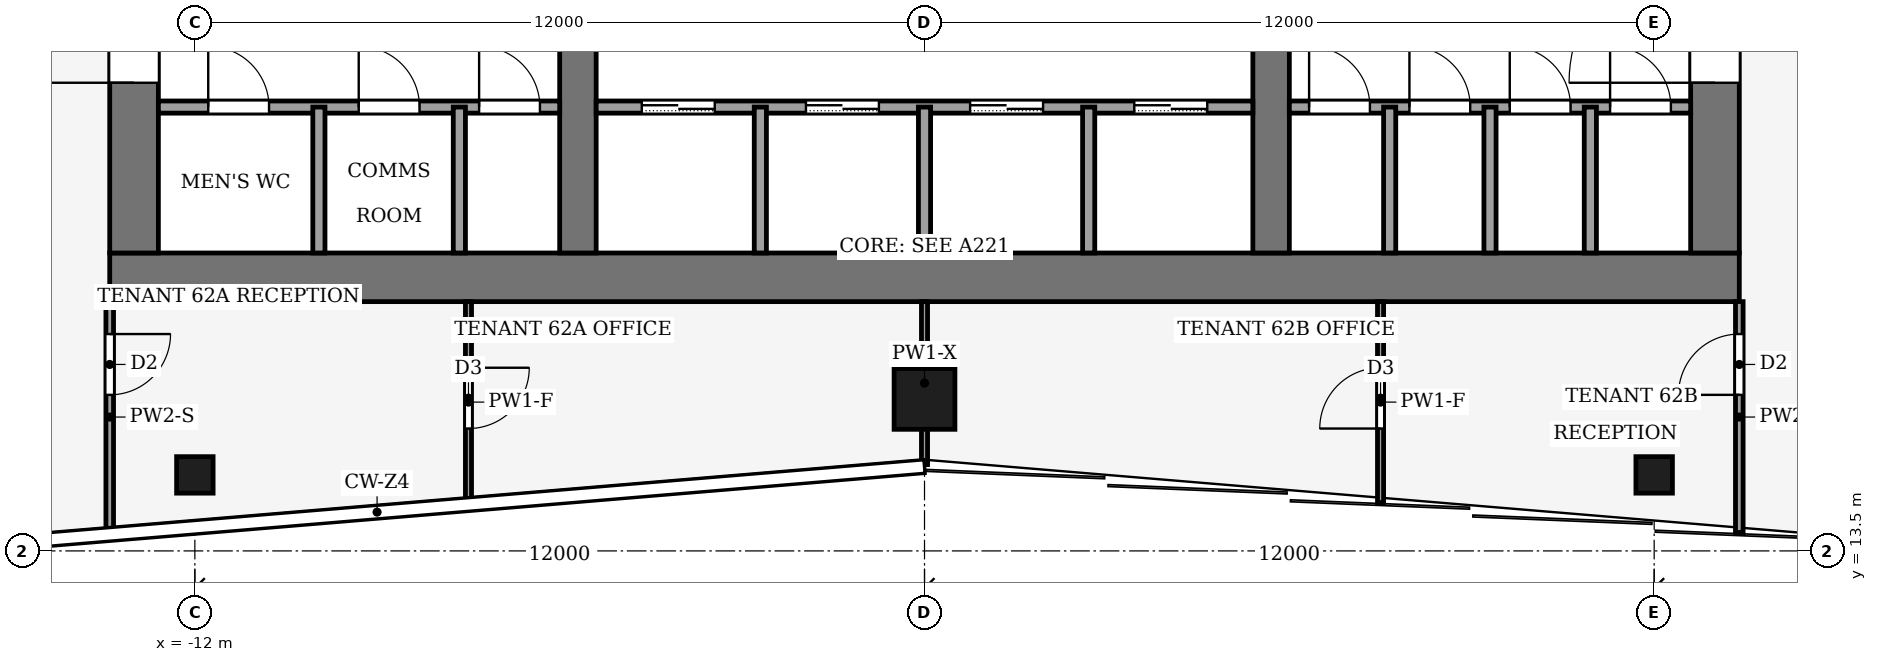
"""IFC4 building model, lengths in metres.
Left out: names, types, materials, properties, quantities, classifications, styles, units other than length and angle.
Written with IfcOpenShell. Run it as: python <this file> out.ifc"""

import sys

from ifc_helpers import new_model, si_unit, direction, frame, frame_2d, origin, origin_2d, place, context, subcontext, project, spatial, rectangle, hollow_rectangle, extrude, element, fill, save


model = new_model("IFC4")
c1 = context("Model", 3, precision=1e-05, world=origin(), true_north=direction((0.0, 1.0)))
c2 = subcontext(c1, "Body", "Model", "MODEL_VIEW")
j1 = project(units=[si_unit("LENGTHUNIT", "METRE"), si_unit("PLANEANGLEUNIT", "RADIAN")], contexts=[c1])
p1 = place(None, origin())
s1 = spatial("IfcSite", under=j1, at=p1, CompositionType="ELEMENT")
p2 = place(p1, origin())
s2 = spatial("IfcBuilding", under=s1, at=p2, CompositionType="ELEMENT")
p3 = place(p2, frame((0.0, 0.0, 270.0)))
s3 = spatial("IfcBuildingStorey", under=s2, at=p3, CompositionType="ELEMENT", Elevation=270.0)
p4 = place(p3, frame((-13.4, 18.0, -0.13), z_axis=(0.0, 0.0, 1.0), x_axis=(1.0, 0.0, 0.0)))
e1 = element("IfcWall", 1, at=p4, inside=s3, PredefinedType="SHEAR", context=c2, shape_type="SweptSolid", body=[
    extrude(rectangle(XDim=26.8, YDim=0.8, at=frame_2d((13.4, 0.0))), origin(), (0.0, 0.0, 1.0), 4.0),
])
p5 = place(p3, frame((-13.0, 18.4, -0.13), z_axis=(0.0, 0.0, 1.0), x_axis=(0.0, 1.0, 0.0)))
e2 = element("IfcWall", 2, at=p5, inside=s3, PredefinedType="SHEAR", context=c2, shape_type="SweptSolid", body=[
    extrude(rectangle(XDim=19.2, YDim=0.8, at=frame_2d((9.6, 0.0))), origin(), (0.0, 0.0, 1.0), 4.0),
])
p6 = place(p5, frame((2.8, 0.0, 0.13)))
e3 = element("IfcOpeningElement", 3, at=p6, cuts=e2, PredefinedType="OPENING", context=c2, shape_type="SweptSolid", body=[
    extrude(rectangle(XDim=2.4, YDim=2.4, at=frame_2d((1.2, 1.2))), frame((0.0, 0.41, 0.0), z_axis=(0.0, -1.0, 0.0), x_axis=(1.0, 0.0, 0.0)), (0.0, 0.0, 1.0), 0.82),
])
p7 = place(p5, frame((13.4, 0.0, 0.13)))
e4 = element("IfcOpeningElement", 4, at=p7, cuts=e2, PredefinedType="OPENING", context=c2, shape_type="SweptSolid", body=[
    extrude(rectangle(XDim=1.4, YDim=2.2, at=frame_2d((0.7, 1.1))), frame((0.0, 0.41, 0.0), z_axis=(0.0, -1.0, 0.0), x_axis=(1.0, 0.0, 0.0)), (0.0, 0.0, 1.0), 0.82),
])
p8 = place(p3, frame((13.0, 18.4, -0.13), z_axis=(0.0, 0.0, 1.0), x_axis=(0.0, 1.0, 0.0)))
e5 = element("IfcWall", 5, at=p8, inside=s3, PredefinedType="SHEAR", context=c2, shape_type="SweptSolid", body=[
    extrude(rectangle(XDim=19.2, YDim=0.8, at=frame_2d((9.6, 0.0))), origin(), (0.0, 0.0, 1.0), 4.0),
])
p9 = place(p8, frame((2.8, 0.0, 0.13)))
e6 = element("IfcOpeningElement", 6, at=p9, cuts=e5, PredefinedType="OPENING", context=c2, shape_type="SweptSolid", body=[
    extrude(rectangle(XDim=2.4, YDim=2.4, at=frame_2d((1.2, 1.2))), frame((0.0, 0.41, 0.0), z_axis=(0.0, -1.0, 0.0), x_axis=(1.0, 0.0, 0.0)), (0.0, 0.0, 1.0), 0.82),
])
p10 = place(p8, frame((13.3, 0.0, 0.13)))
e7 = element("IfcOpeningElement", 7, at=p10, cuts=e5, PredefinedType="OPENING", context=c2, shape_type="SweptSolid", body=[
    extrude(rectangle(XDim=2.4, YDim=2.4, at=frame_2d((1.2, 1.2))), frame((0.0, 0.41, 0.0), z_axis=(0.0, -1.0, 0.0), x_axis=(1.0, 0.0, 0.0)), (0.0, 0.0, 1.0), 0.82),
])
p11 = place(p3, frame((-5.7, 18.4, -0.13), z_axis=(0.0, 0.0, 1.0), x_axis=(0.0, 1.0, 0.0)))
e8 = element("IfcWall", 8, at=p11, inside=s3, PredefinedType="SHEAR", context=c2, shape_type="SweptSolid", body=[
    extrude(rectangle(XDim=19.2, YDim=0.6, at=frame_2d((9.6, 0.0))), origin(), (0.0, 0.0, 1.0), 4.0),
])
p12 = place(p11, frame((8.35, 0.0, 0.13)))
e9 = element("IfcOpeningElement", 9, at=p12, cuts=e8, PredefinedType="OPENING", context=c2, shape_type="SweptSolid", body=[
    extrude(rectangle(XDim=0.9, YDim=2.1, at=frame_2d((0.45, 1.05))), frame((0.0, 0.31, 0.0), z_axis=(0.0, -1.0, 0.0), x_axis=(1.0, 0.0, 0.0)), (0.0, 0.0, 1.0), 0.62),
])
p13 = place(p3, frame((5.7, 18.4, -0.13), z_axis=(0.0, 0.0, 1.0), x_axis=(0.0, 1.0, 0.0)))
e10 = element("IfcWall", 10, at=p13, inside=s3, PredefinedType="SHEAR", context=c2, shape_type="SweptSolid", body=[
    extrude(rectangle(XDim=19.2, YDim=0.6, at=frame_2d((9.6, 0.0))), origin(), (0.0, 0.0, 1.0), 4.0),
])
p14 = place(p13, frame((13.3, 0.0, 0.13)))
e11 = element("IfcOpeningElement", 11, at=p14, cuts=e10, PredefinedType="OPENING", context=c2, shape_type="SweptSolid", body=[
    extrude(rectangle(XDim=2.4, YDim=2.4, at=frame_2d((1.2, 1.2))), frame((0.0, 0.31, 0.0), z_axis=(0.0, -1.0, 0.0), x_axis=(1.0, 0.0, 0.0)), (0.0, 0.0, 1.0), 0.62),
])
p15 = place(p3, frame((0.0, 16.0, 0.0), z_axis=(0.0, 0.0, 1.0), x_axis=(1.0, 0.0, 0.0)))
e12 = element("IfcColumn", 12, at=p15, inside=s3, PredefinedType="COLUMN", context=c2, shape_type="SweptSolid", body=[
    extrude(hollow_rectangle(XDim=1.0, YDim=1.0, WallThickness=0.045, at=origin_2d()), origin(), (0.0, 0.0, 1.0), 4.0),
])
for number, where, z_axis, x_axis in (
    (13, (-12.0, 14.75, 0.0), (0.0, 0.0, 1.0), (1.0, 0.0, 0.0)),
    (14, (12.0, 14.75, 0.0), (0.0, 0.0, 1.0), (1.0, 0.0, 0.0)),
):
    element("IfcColumn", number, at=place(p3, frame(where, z_axis=z_axis, x_axis=x_axis)), inside=s3, PredefinedType="COLUMN", context=c2, shape_type="SweptSolid", body=[
        extrude(hollow_rectangle(XDim=0.6, YDim=0.6, WallThickness=0.025, at=origin_2d()), origin(), (0.0, 0.0, 1.0), 4.0),
    ])
p16 = place(p3, frame((-12.6, 20.8, 0.0), z_axis=(0.0, 0.0, 1.0), x_axis=(1.0, 0.0, 0.0)))
e15 = element("IfcWall", 15, at=p16, inside=s3, PredefinedType="PARTITIONING", context=c2, shape_type="SweptSolid", body=[
    extrude(rectangle(XDim=6.6, YDim=0.2, at=frame_2d((3.3, 0.0))), origin(), (0.0, 0.0, 1.0), 3.87),
])
p17 = place(p16, frame((0.82, 0.0, 0.0)))
e16 = element("IfcOpeningElement", 16, at=p17, cuts=e15, PredefinedType="OPENING", context=c2, shape_type="SweptSolid", body=[
    extrude(rectangle(XDim=1.0, YDim=2.1, at=frame_2d((0.5, 1.05))), frame((0.0, 0.11, 0.0), z_axis=(0.0, -1.0, 0.0), x_axis=(1.0, 0.0, 0.0)), (0.0, 0.0, 1.0), 0.22),
])
p18 = place(p16, frame((3.295, 0.0, 0.0)))
e17 = element("IfcOpeningElement", 17, at=p18, cuts=e15, PredefinedType="OPENING", context=c2, shape_type="SweptSolid", body=[
    extrude(rectangle(XDim=1.0, YDim=2.1, at=frame_2d((0.5, 1.05))), frame((0.0, 0.11, 0.0), z_axis=(0.0, -1.0, 0.0), x_axis=(1.0, 0.0, 0.0)), (0.0, 0.0, 1.0), 0.22),
])
p19 = place(p16, frame((5.275, 0.0, 0.0)))
e18 = element("IfcOpeningElement", 18, at=p19, cuts=e15, PredefinedType="OPENING", context=c2, shape_type="SweptSolid", body=[
    extrude(rectangle(XDim=1.0, YDim=2.1, at=frame_2d((0.5, 1.05))), frame((0.0, 0.11, 0.0), z_axis=(0.0, -1.0, 0.0), x_axis=(1.0, 0.0, 0.0)), (0.0, 0.0, 1.0), 0.22),
])
p20 = place(p3, frame((-5.4, 20.8, 0.0), z_axis=(0.0, 0.0, 1.0), x_axis=(1.0, 0.0, 0.0)))
e19 = element("IfcWall", 19, at=p20, inside=s3, PredefinedType="PARTITIONING", context=c2, shape_type="SweptSolid", body=[
    extrude(rectangle(XDim=10.8, YDim=0.2, at=frame_2d((5.4, 0.0))), origin(), (0.0, 0.0, 1.0), 3.87),
])
p21 = place(p20, frame((0.75, 0.0, 0.0)))
e20 = element("IfcOpeningElement", 20, at=p21, cuts=e19, PredefinedType="OPENING", context=c2, shape_type="SweptSolid", body=[
    extrude(rectangle(XDim=1.2, YDim=2.2, at=frame_2d((0.6, 1.1))), frame((0.0, 0.11, 0.0), z_axis=(0.0, -1.0, 0.0), x_axis=(1.0, 0.0, 0.0)), (0.0, 0.0, 1.0), 0.22),
])
p22 = place(p20, frame((3.45, 0.0, 0.0)))
e21 = element("IfcOpeningElement", 21, at=p22, cuts=e19, PredefinedType="OPENING", context=c2, shape_type="SweptSolid", body=[
    extrude(rectangle(XDim=1.2, YDim=2.2, at=frame_2d((0.6, 1.1))), frame((0.0, 0.11, 0.0), z_axis=(0.0, -1.0, 0.0), x_axis=(1.0, 0.0, 0.0)), (0.0, 0.0, 1.0), 0.22),
])
p23 = place(p20, frame((6.15, 0.0, 0.0)))
e22 = element("IfcOpeningElement", 22, at=p23, cuts=e19, PredefinedType="OPENING", context=c2, shape_type="SweptSolid", body=[
    extrude(rectangle(XDim=1.2, YDim=2.2, at=frame_2d((0.6, 1.1))), frame((0.0, 0.11, 0.0), z_axis=(0.0, -1.0, 0.0), x_axis=(1.0, 0.0, 0.0)), (0.0, 0.0, 1.0), 0.22),
])
p24 = place(p20, frame((8.85, 0.0, 0.0)))
e23 = element("IfcOpeningElement", 23, at=p24, cuts=e19, PredefinedType="OPENING", context=c2, shape_type="SweptSolid", body=[
    extrude(rectangle(XDim=1.2, YDim=2.2, at=frame_2d((0.6, 1.1))), frame((0.0, 0.11, 0.0), z_axis=(0.0, -1.0, 0.0), x_axis=(1.0, 0.0, 0.0)), (0.0, 0.0, 1.0), 0.22),
])
p25 = place(p3, frame((6.0, 20.8, 0.0), z_axis=(0.0, 0.0, 1.0), x_axis=(1.0, 0.0, 0.0)))
e24 = element("IfcWall", 24, at=p25, inside=s3, PredefinedType="PARTITIONING", context=c2, shape_type="SweptSolid", body=[
    extrude(rectangle(XDim=6.6, YDim=0.2, at=frame_2d((3.3, 0.0))), origin(), (0.0, 0.0, 1.0), 3.87),
])
p26 = place(p25, frame((0.325, 0.0, 0.0)))
e25 = element("IfcOpeningElement", 25, at=p26, cuts=e24, PredefinedType="OPENING", context=c2, shape_type="SweptSolid", body=[
    extrude(rectangle(XDim=1.0, YDim=2.1, at=frame_2d((0.5, 1.05))), frame((0.0, 0.11, 0.0), z_axis=(0.0, -1.0, 0.0), x_axis=(1.0, 0.0, 0.0)), (0.0, 0.0, 1.0), 0.22),
])
p27 = place(p25, frame((1.975, 0.0, 0.0)))
e26 = element("IfcOpeningElement", 26, at=p27, cuts=e24, PredefinedType="OPENING", context=c2, shape_type="SweptSolid", body=[
    extrude(rectangle(XDim=1.0, YDim=2.1, at=frame_2d((0.5, 1.05))), frame((0.0, 0.11, 0.0), z_axis=(0.0, -1.0, 0.0), x_axis=(1.0, 0.0, 0.0)), (0.0, 0.0, 1.0), 0.22),
])
p28 = place(p25, frame((3.625, 0.0, 0.0)))
e27 = element("IfcOpeningElement", 27, at=p28, cuts=e24, PredefinedType="OPENING", context=c2, shape_type="SweptSolid", body=[
    extrude(rectangle(XDim=1.0, YDim=2.1, at=frame_2d((0.5, 1.05))), frame((0.0, 0.11, 0.0), z_axis=(0.0, -1.0, 0.0), x_axis=(1.0, 0.0, 0.0)), (0.0, 0.0, 1.0), 0.22),
])
p29 = place(p25, frame((5.275, 0.0, 0.0)))
e28 = element("IfcOpeningElement", 28, at=p29, cuts=e24, PredefinedType="OPENING", context=c2, shape_type="SweptSolid", body=[
    extrude(rectangle(XDim=1.0, YDim=2.1, at=frame_2d((0.5, 1.05))), frame((0.0, 0.11, 0.0), z_axis=(0.0, -1.0, 0.0), x_axis=(1.0, 0.0, 0.0)), (0.0, 0.0, 1.0), 0.22),
])
for number, where, z_axis, x_axis in (
    (29, (-9.96, 18.4, 0.0), (0.0, 0.0, 1.0), (0.0, 1.0, 0.0)),
    (30, (-7.65, 18.4, 0.0), (0.0, 0.0, 1.0), (0.0, 1.0, 0.0)),
    (31, (-2.7, 18.4, 0.0), (0.0, 0.0, 1.0), (0.0, 1.0, 0.0)),
    (32, (0.0, 18.4, 0.0), (0.0, 0.0, 1.0), (0.0, 1.0, 0.0)),
    (33, (2.7, 18.4, 0.0), (0.0, 0.0, 1.0), (0.0, 1.0, 0.0)),
    (34, (7.65, 18.4, 0.0), (0.0, 0.0, 1.0), (0.0, 1.0, 0.0)),
    (35, (9.3, 18.4, 0.0), (0.0, 0.0, 1.0), (0.0, 1.0, 0.0)),
    (36, (10.95, 18.4, 0.0), (0.0, 0.0, 1.0), (0.0, 1.0, 0.0)),
):
    element("IfcWall", number, at=place(p3, frame(where, z_axis=z_axis, x_axis=x_axis)), inside=s3, PredefinedType="PARTITIONING", context=c2, shape_type="SweptSolid", body=[
        extrude(rectangle(XDim=2.4, YDim=0.2, at=frame_2d((1.2, 0.0))), origin(), (0.0, 0.0, 1.0), 3.87),
    ])
p30 = place(p3, frame((-13.4, 17.6, 0.0), z_axis=(0.0, 0.0, 1.0), x_axis=(0.0, -1.0, 0.0)))
e37 = element("IfcWall", 37, at=p30, inside=s3, PredefinedType="PARTITIONING", context=c2, shape_type="SweptSolid", body=[
    extrude(rectangle(XDim=3.797, YDim=0.125, at=frame_2d((1.898, 0.0))), origin(), (0.0, 0.0, 1.0), 3.04),
])
p31 = place(p30, frame((0.533, 0.0, 0.0)))
e38 = element("IfcOpeningElement", 38, at=p31, cuts=e37, PredefinedType="OPENING", context=c2, shape_type="SweptSolid", body=[
    extrude(rectangle(XDim=1.0, YDim=2.1, at=frame_2d((0.5, 1.05))), frame((0.0, 0.073, 0.0), z_axis=(0.0, -1.0, 0.0), x_axis=(1.0, 0.0, 0.0)), (0.0, 0.0, 1.0), 0.145),
])
p32 = place(p3, frame((13.4, 13.803, 0.0), z_axis=(0.0, 0.0, 1.0), x_axis=(0.0, 1.0, 0.0)))
e39 = element("IfcWall", 39, at=p32, inside=s3, PredefinedType="PARTITIONING", context=c2, shape_type="SweptSolid", body=[
    extrude(rectangle(XDim=3.797, YDim=0.125, at=frame_2d((1.898, 0.0))), origin(), (0.0, 0.0, 1.0), 3.04),
])
p33 = place(p32, frame((2.263, 0.0, 0.0)))
e40 = element("IfcOpeningElement", 40, at=p33, cuts=e39, PredefinedType="OPENING", context=c2, shape_type="SweptSolid", body=[
    extrude(rectangle(XDim=1.0, YDim=2.1, at=frame_2d((0.5, 1.05))), frame((0.0, 0.073, 0.0), z_axis=(0.0, -1.0, 0.0), x_axis=(1.0, 0.0, 0.0)), (0.0, 0.0, 1.0), 0.145),
])
p34 = place(p3, frame((-7.5, 17.6, 0.0), z_axis=(0.0, 0.0, 1.0), x_axis=(0.0, -1.0, 0.0)))
e41 = element("IfcWall", 41, at=p34, inside=s3, PredefinedType="PARTITIONING", context=c2, shape_type="SweptSolid", body=[
    extrude(rectangle(XDim=3.305, YDim=0.1, at=frame_2d((1.653, 0.0))), origin(), (0.0, 0.0, 1.0), 3.04),
])
p35 = place(p34, frame((1.087, 0.0, 0.0)))
e42 = element("IfcOpeningElement", 42, at=p35, cuts=e41, PredefinedType="OPENING", context=c2, shape_type="SweptSolid", body=[
    extrude(rectangle(XDim=1.0, YDim=2.1, at=frame_2d((0.5, 1.05))), frame((0.0, 0.06, 0.0), z_axis=(0.0, -1.0, 0.0), x_axis=(1.0, 0.0, 0.0)), (0.0, 0.0, 1.0), 0.12),
])
p36 = place(p3, frame((0.0, 14.92, 0.0), z_axis=(0.0, 0.0, 1.0), x_axis=(0.0, 1.0, 0.0)))
e43 = element("IfcWall", 43, at=p36, inside=s3, PredefinedType="PARTITIONING", context=c2, shape_type="SweptSolid", body=[
    extrude(rectangle(XDim=2.68, YDim=0.1, at=frame_2d((1.34, 0.0))), origin(), (0.0, 0.0, 1.0), 3.54),
])
p37 = place(p3, frame((7.5, 14.295, 0.0), z_axis=(0.0, 0.0, 1.0), x_axis=(0.0, 1.0, 0.0)))
e44 = element("IfcWall", 44, at=p37, inside=s3, PredefinedType="PARTITIONING", context=c2, shape_type="SweptSolid", body=[
    extrude(rectangle(XDim=3.305, YDim=0.1, at=frame_2d((1.653, 0.0))), origin(), (0.0, 0.0, 1.0), 3.04),
])
p38 = place(p37, frame((1.218, 0.0, 0.0)))
e45 = element("IfcOpeningElement", 45, at=p38, cuts=e44, PredefinedType="OPENING", context=c2, shape_type="SweptSolid", body=[
    extrude(rectangle(XDim=1.0, YDim=2.1, at=frame_2d((0.5, 1.05))), frame((0.0, 0.06, 0.0), z_axis=(0.0, -1.0, 0.0), x_axis=(1.0, 0.0, 0.0)), (0.0, 0.0, 1.0), 0.12),
])
p39 = place(p21, origin())
e46 = element("IfcDoor", 46, at=p39, inside=s3, OperationType="SLIDING_TO_LEFT", PredefinedType="DOOR", context=c2, shape_type="SweptSolid", body=[
    extrude(rectangle(XDim=1.2, YDim=2.2, at=frame_2d((0.6, 1.1))), frame((0.0, 0.025, 0.0), z_axis=(0.0, -1.0, 0.0), x_axis=(1.0, 0.0, 0.0)), (0.0, 0.0, 1.0), 0.05),
])
fill(e20, e46)
p40 = place(p22, origin())
e47 = element("IfcDoor", 47, at=p40, inside=s3, OperationType="SLIDING_TO_LEFT", PredefinedType="DOOR", context=c2, shape_type="SweptSolid", body=[
    extrude(rectangle(XDim=1.2, YDim=2.2, at=frame_2d((0.6, 1.1))), frame((0.0, 0.025, 0.0), z_axis=(0.0, -1.0, 0.0), x_axis=(1.0, 0.0, 0.0)), (0.0, 0.0, 1.0), 0.05),
])
fill(e21, e47)
p41 = place(p23, origin())
e48 = element("IfcDoor", 48, at=p41, inside=s3, OperationType="SLIDING_TO_LEFT", PredefinedType="DOOR", context=c2, shape_type="SweptSolid", body=[
    extrude(rectangle(XDim=1.2, YDim=2.2, at=frame_2d((0.6, 1.1))), frame((0.0, 0.025, 0.0), z_axis=(0.0, -1.0, 0.0), x_axis=(1.0, 0.0, 0.0)), (0.0, 0.0, 1.0), 0.05),
])
fill(e22, e48)
p42 = place(p24, origin())
e49 = element("IfcDoor", 49, at=p42, inside=s3, OperationType="SLIDING_TO_LEFT", PredefinedType="DOOR", context=c2, shape_type="SweptSolid", body=[
    extrude(rectangle(XDim=1.2, YDim=2.2, at=frame_2d((0.6, 1.1))), frame((0.0, 0.025, 0.0), z_axis=(0.0, -1.0, 0.0), x_axis=(1.0, 0.0, 0.0)), (0.0, 0.0, 1.0), 0.05),
])
fill(e23, e49)
p43 = place(p17, origin())
e50 = element("IfcDoor", 50, at=p43, inside=s3, OperationType="SINGLE_SWING_LEFT", PredefinedType="DOOR", context=c2, shape_type="SweptSolid", body=[
    extrude(rectangle(XDim=1.0, YDim=2.1, at=frame_2d((0.5, 1.05))), frame((0.0, 0.025, 0.0), z_axis=(0.0, -1.0, 0.0), x_axis=(1.0, 0.0, 0.0)), (0.0, 0.0, 1.0), 0.05),
])
fill(e16, e50)
p44 = place(p18, origin())
e51 = element("IfcDoor", 51, at=p44, inside=s3, OperationType="SINGLE_SWING_LEFT", PredefinedType="DOOR", context=c2, shape_type="SweptSolid", body=[
    extrude(rectangle(XDim=1.0, YDim=2.1, at=frame_2d((0.5, 1.05))), frame((0.0, 0.025, 0.0), z_axis=(0.0, -1.0, 0.0), x_axis=(1.0, 0.0, 0.0)), (0.0, 0.0, 1.0), 0.05),
])
fill(e17, e51)
p45 = place(p19, origin())
e52 = element("IfcDoor", 52, at=p45, inside=s3, OperationType="SINGLE_SWING_RIGHT", PredefinedType="DOOR", context=c2, shape_type="SweptSolid", body=[
    extrude(rectangle(XDim=1.0, YDim=2.1, at=frame_2d((0.5, 1.05))), frame((0.0, 0.025, 0.0), z_axis=(0.0, -1.0, 0.0), x_axis=(1.0, 0.0, 0.0)), (0.0, 0.0, 1.0), 0.05),
])
fill(e18, e52)
p46 = place(p26, origin())
e53 = element("IfcDoor", 53, at=p46, inside=s3, OperationType="SINGLE_SWING_LEFT", PredefinedType="DOOR", context=c2, shape_type="SweptSolid", body=[
    extrude(rectangle(XDim=1.0, YDim=2.1, at=frame_2d((0.5, 1.05))), frame((0.0, 0.025, 0.0), z_axis=(0.0, -1.0, 0.0), x_axis=(1.0, 0.0, 0.0)), (0.0, 0.0, 1.0), 0.05),
])
fill(e25, e53)
p47 = place(p27, origin())
e54 = element("IfcDoor", 54, at=p47, inside=s3, OperationType="SINGLE_SWING_LEFT", PredefinedType="DOOR", context=c2, shape_type="SweptSolid", body=[
    extrude(rectangle(XDim=1.0, YDim=2.1, at=frame_2d((0.5, 1.05))), frame((0.0, 0.025, 0.0), z_axis=(0.0, -1.0, 0.0), x_axis=(1.0, 0.0, 0.0)), (0.0, 0.0, 1.0), 0.05),
])
fill(e26, e54)
p48 = place(p28, origin())
e55 = element("IfcDoor", 55, at=p48, inside=s3, OperationType="SINGLE_SWING_RIGHT", PredefinedType="DOOR", context=c2, shape_type="SweptSolid", body=[
    extrude(rectangle(XDim=1.0, YDim=2.1, at=frame_2d((0.5, 1.05))), frame((0.0, 0.025, 0.0), z_axis=(0.0, -1.0, 0.0), x_axis=(1.0, 0.0, 0.0)), (0.0, 0.0, 1.0), 0.05),
])
fill(e27, e55)
p49 = place(p29, origin())
e56 = element("IfcDoor", 56, at=p49, inside=s3, OperationType="SINGLE_SWING_RIGHT", PredefinedType="DOOR", context=c2, shape_type="SweptSolid", body=[
    extrude(rectangle(XDim=1.0, YDim=2.1, at=frame_2d((0.5, 1.05))), frame((0.0, 0.025, 0.0), z_axis=(0.0, -1.0, 0.0), x_axis=(1.0, 0.0, 0.0)), (0.0, 0.0, 1.0), 0.05),
])
fill(e28, e56)
p50 = place(p6, origin())
e57 = element("IfcDoor", 57, at=p50, inside=s3, OperationType="DOUBLE_DOOR_SINGLE_SWING", PredefinedType="DOOR", context=c2, shape_type="SweptSolid", body=[
    extrude(rectangle(XDim=2.4, YDim=2.4, at=frame_2d((1.2, 1.2))), frame((0.0, 0.025, 0.0), z_axis=(0.0, -1.0, 0.0), x_axis=(1.0, 0.0, 0.0)), (0.0, 0.0, 1.0), 0.05),
])
fill(e3, e57)
p51 = place(p9, origin())
e58 = element("IfcDoor", 58, at=p51, inside=s3, OperationType="DOUBLE_DOOR_SINGLE_SWING", PredefinedType="DOOR", context=c2, shape_type="SweptSolid", body=[
    extrude(rectangle(XDim=2.4, YDim=2.4, at=frame_2d((1.2, 1.2))), frame((0.0, 0.025, 0.0), z_axis=(0.0, -1.0, 0.0), x_axis=(1.0, 0.0, 0.0)), (0.0, 0.0, 1.0), 0.05),
])
fill(e6, e58)
p52 = place(p31, origin())
e59 = element("IfcDoor", 59, at=p52, inside=s3, OperationType="SINGLE_SWING_LEFT", PredefinedType="DOOR", context=c2, shape_type="SweptSolid", body=[
    extrude(rectangle(XDim=1.0, YDim=2.1, at=frame_2d((0.5, 1.05))), frame((0.0, 0.025, 0.0), z_axis=(0.0, -1.0, 0.0), x_axis=(1.0, 0.0, 0.0)), (0.0, 0.0, 1.0), 0.05),
])
fill(e38, e59)
p53 = place(p33, origin())
e60 = element("IfcDoor", 60, at=p53, inside=s3, OperationType="SINGLE_SWING_RIGHT", PredefinedType="DOOR", context=c2, shape_type="SweptSolid", body=[
    extrude(rectangle(XDim=1.0, YDim=2.1, at=frame_2d((0.5, 1.05))), frame((0.0, 0.025, 0.0), z_axis=(0.0, -1.0, 0.0), x_axis=(1.0, 0.0, 0.0)), (0.0, 0.0, 1.0), 0.05),
])
fill(e40, e60)
p54 = place(p35, origin())
e61 = element("IfcDoor", 61, at=p54, inside=s3, OperationType="SINGLE_SWING_LEFT", PredefinedType="DOOR", context=c2, shape_type="SweptSolid", body=[
    extrude(rectangle(XDim=1.0, YDim=2.1, at=frame_2d((0.5, 1.05))), frame((0.0, 0.025, 0.0), z_axis=(0.0, -1.0, 0.0), x_axis=(1.0, 0.0, 0.0)), (0.0, 0.0, 1.0), 0.05),
])
fill(e42, e61)
p55 = place(p38, origin())
e62 = element("IfcDoor", 62, at=p55, inside=s3, OperationType="SINGLE_SWING_RIGHT", PredefinedType="DOOR", context=c2, shape_type="SweptSolid", body=[
    extrude(rectangle(XDim=1.0, YDim=2.1, at=frame_2d((0.5, 1.05))), frame((0.0, 0.025, 0.0), z_axis=(0.0, -1.0, 0.0), x_axis=(1.0, 0.0, 0.0)), (0.0, 0.0, 1.0), 0.05),
])
fill(e45, e62)
save(model, sys.argv[1])
